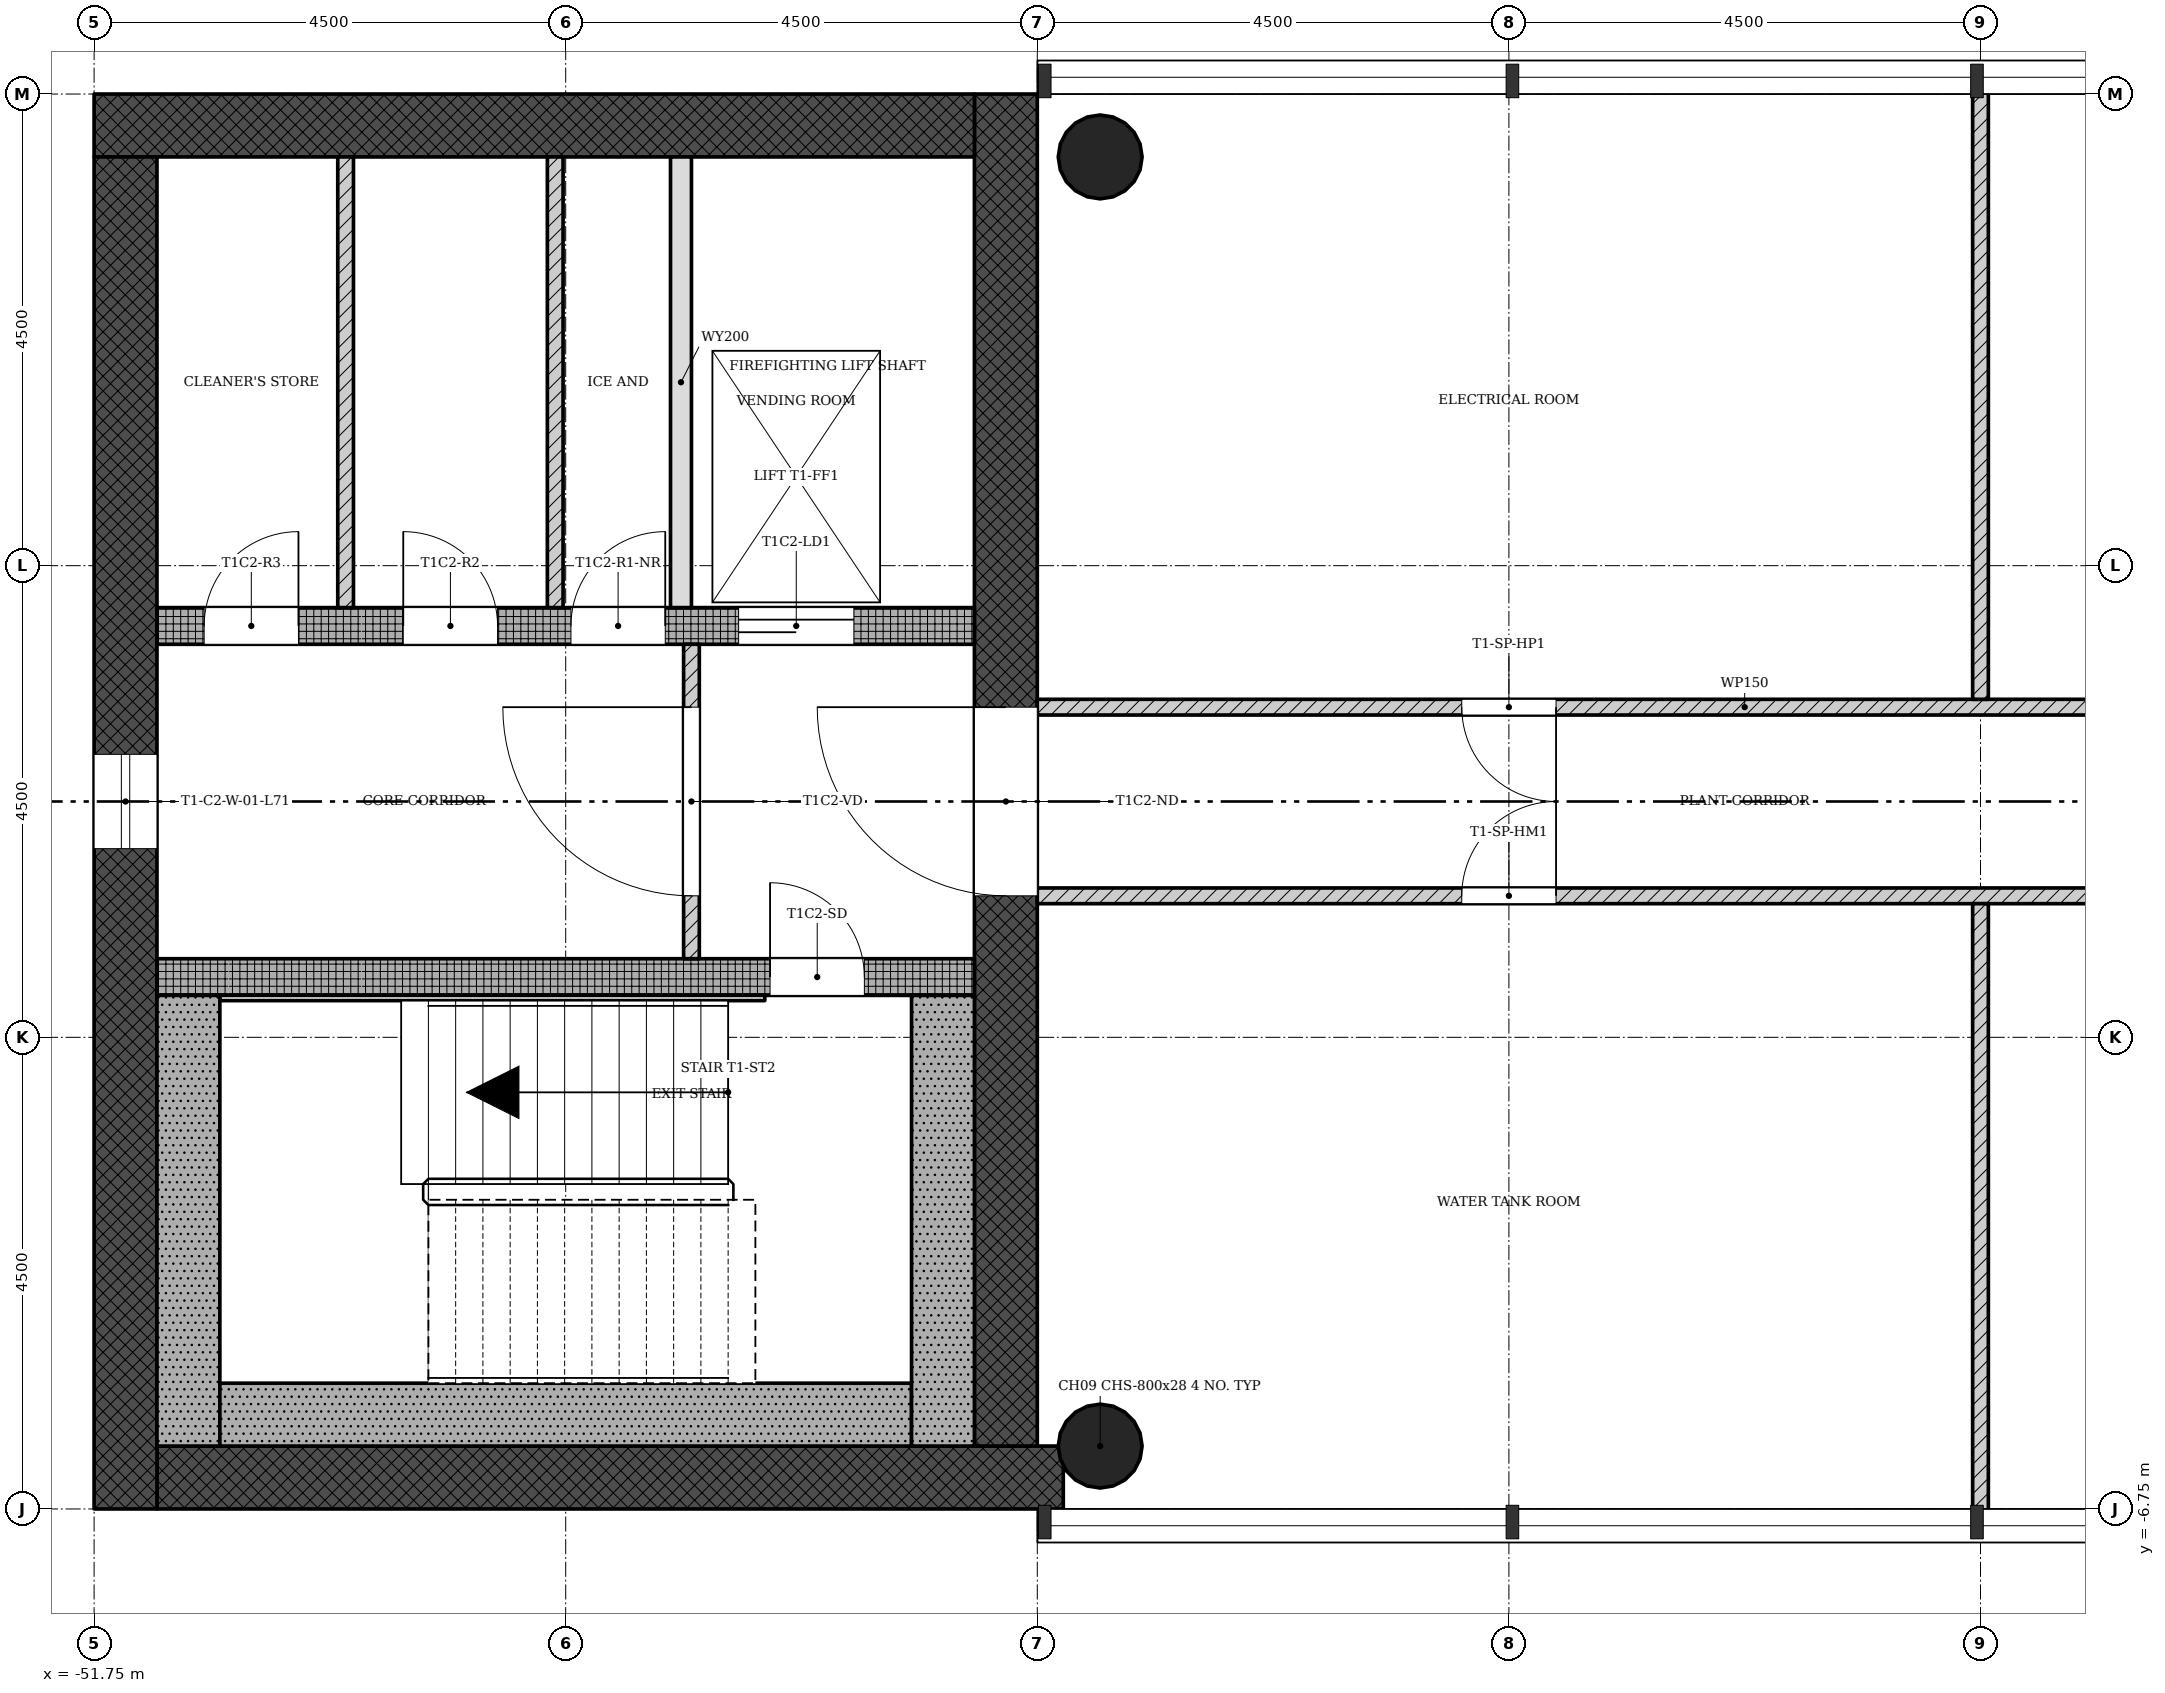
"""IFC4 building model, lengths in metres.
Left out: names, types, materials, properties, quantities, classifications, styles, units other than length and angle.
Written with IfcOpenShell. Run it as: python <this file> out.ifc"""

import sys

from ifc_helpers import new_model, si_unit, direction, frame, frame_2d, origin, origin_2d, place, context, subcontext, project, spatial, rectangle, hollow_circle, extrude, element, fill, save


model = new_model("IFC4")
c1 = context("Model", 3, precision=1e-05, world=origin(), true_north=direction((0.0, 1.0)))
c2 = subcontext(c1, "Body", "Model", "MODEL_VIEW")
j1 = project(units=[si_unit("LENGTHUNIT", "METRE"), si_unit("PLANEANGLEUNIT", "RADIAN")], contexts=[c1])
p1 = place(None, origin())
s1 = spatial("IfcSite", under=j1, at=p1, CompositionType="ELEMENT")
p2 = place(p1, origin())
s2 = spatial("IfcBuilding", under=s1, at=p2, CompositionType="ELEMENT")
p3 = place(p2, frame((0.0, 0.0, 260.4)))
s3 = spatial("IfcBuildingStorey", under=s2, at=p3, CompositionType="ELEMENT", Elevation=260.4)
p4 = place(p3, frame((-51.15, -6.45, 0.0), z_axis=(0.0, 0.0, 1.0), x_axis=(1.0, 0.0, 0.0)))
e1 = element("IfcWall", 1, at=p4, inside=s3, PredefinedType="SHEAR", context=c2, shape_type="SweptSolid", body=[
    extrude(rectangle(XDim=8.648, YDim=0.6, at=frame_2d((4.324, 0.0))), origin(), (0.0, 0.0, 1.0), 4.5),
])
p5 = place(p3, frame((-43.05, -6.15, 0.0), z_axis=(0.0, 0.0, 1.0), x_axis=(0.0, 1.0, 0.0)))
e2 = element("IfcWall", 2, at=p5, inside=s3, PredefinedType="SHEAR", context=c2, shape_type="SweptSolid", body=[
    extrude(rectangle(XDim=12.9, YDim=0.6, at=frame_2d((6.45, 0.0))), origin(), (0.0, 0.0, 1.0), 4.5),
])
p6 = place(p5, frame((5.25, 0.0, 0.0)))
e3 = element("IfcOpeningElement", 3, at=p6, cuts=e2, PredefinedType="OPENING", context=c2, shape_type="SweptSolid", body=[
    extrude(rectangle(XDim=1.8, YDim=2.1, at=frame_2d((0.9, 1.05))), frame((0.0, 0.31, 0.0), z_axis=(0.0, -1.0, 0.0), x_axis=(1.0, 0.0, 0.0)), (0.0, 0.0, 1.0), 0.62),
])
p7 = place(p3, frame((-43.35, 6.45, 0.0), z_axis=(0.0, 0.0, 1.0), x_axis=(-1.0, 0.0, 0.0)))
e4 = element("IfcWall", 4, at=p7, inside=s3, PredefinedType="SHEAR", context=c2, shape_type="SweptSolid", body=[
    extrude(rectangle(XDim=8.4, YDim=0.6, at=frame_2d((4.2, 0.0))), origin(), (0.0, 0.0, 1.0), 4.5),
])
p8 = place(p3, frame((-51.45, 6.15, 0.0), z_axis=(0.0, 0.0, 1.0), x_axis=(0.0, -1.0, 0.0)))
e5 = element("IfcWall", 5, at=p8, inside=s3, PredefinedType="SHEAR", context=c2, shape_type="SweptSolid", body=[
    extrude(rectangle(XDim=12.9, YDim=0.6, at=frame_2d((6.45, 0.0))), origin(), (0.0, 0.0, 1.0), 4.5),
])
p9 = place(p8, frame((5.7, 0.0, 0.45)))
e6 = element("IfcOpeningElement", 6, at=p9, cuts=e5, PredefinedType="OPENING", context=c2, shape_type="SweptSolid", body=[
    extrude(rectangle(XDim=0.9, YDim=2.4, at=frame_2d((0.45, 1.2))), frame((0.0, 0.31, 0.0), z_axis=(0.0, -1.0, 0.0), x_axis=(1.0, 0.0, 0.0)), (0.0, 0.0, 1.0), 0.62),
])
p10 = place(p3, frame((-51.15, -1.675, 0.0), z_axis=(0.0, 0.0, 1.0), x_axis=(1.0, 0.0, 0.0)))
e7 = element("IfcWall", 7, at=p10, inside=s3, PredefinedType="SHEAR", context=c2, shape_type="SweptSolid", body=[
    extrude(rectangle(XDim=7.8, YDim=0.35, at=frame_2d((3.9, 0.0))), origin(), (0.0, 0.0, 1.0), 4.5),
])
p11 = place(p10, frame((5.85, 0.0, 0.0)))
e8 = element("IfcOpeningElement", 8, at=p11, cuts=e7, PredefinedType="OPENING", context=c2, shape_type="SweptSolid", body=[
    extrude(rectangle(XDim=0.9, YDim=2.1, at=frame_2d((0.45, 1.05))), frame((0.0, 0.185, 0.0), z_axis=(0.0, -1.0, 0.0), x_axis=(1.0, 0.0, 0.0)), (0.0, 0.0, 1.0), 0.37),
])
p12 = place(p3, frame((-51.15, 1.675, 0.0), z_axis=(0.0, 0.0, 1.0), x_axis=(1.0, 0.0, 0.0)))
e9 = element("IfcWall", 9, at=p12, inside=s3, PredefinedType="SHEAR", context=c2, shape_type="SweptSolid", body=[
    extrude(rectangle(XDim=7.8, YDim=0.35, at=frame_2d((3.9, 0.0))), origin(), (0.0, 0.0, 1.0), 4.5),
])
p13 = place(p12, frame((5.55, 0.0, 0.0)))
e10 = element("IfcOpeningElement", 10, at=p13, cuts=e9, PredefinedType="OPENING", context=c2, shape_type="SweptSolid", body=[
    extrude(rectangle(XDim=1.1, YDim=2.1, at=frame_2d((0.55, 1.05))), frame((0.0, 0.185, 0.0), z_axis=(0.0, -1.0, 0.0), x_axis=(1.0, 0.0, 0.0)), (0.0, 0.0, 1.0), 0.37),
])
p14 = place(p12, frame((3.95, 0.0, 0.0)))
e11 = element("IfcOpeningElement", 11, at=p14, cuts=e9, PredefinedType="OPENING", context=c2, shape_type="SweptSolid", body=[
    extrude(rectangle(XDim=0.9, YDim=2.1, at=frame_2d((0.45, 1.05))), frame((0.0, 0.185, 0.0), z_axis=(0.0, -1.0, 0.0), x_axis=(1.0, 0.0, 0.0)), (0.0, 0.0, 1.0), 0.37),
])
p15 = place(p12, frame((2.35, 0.0, 0.0)))
e12 = element("IfcOpeningElement", 12, at=p15, cuts=e9, PredefinedType="OPENING", context=c2, shape_type="SweptSolid", body=[
    extrude(rectangle(XDim=0.9, YDim=2.1, at=frame_2d((0.45, 1.05))), frame((0.0, 0.185, 0.0), z_axis=(0.0, -1.0, 0.0), x_axis=(1.0, 0.0, 0.0)), (0.0, 0.0, 1.0), 0.37),
])
p16 = place(p12, frame((0.45, 0.0, 0.0)))
e13 = element("IfcOpeningElement", 13, at=p16, cuts=e9, PredefinedType="OPENING", context=c2, shape_type="SweptSolid", body=[
    extrude(rectangle(XDim=0.9, YDim=2.1, at=frame_2d((0.45, 1.05))), frame((0.0, 0.185, 0.0), z_axis=(0.0, -1.0, 0.0), x_axis=(1.0, 0.0, 0.0)), (0.0, 0.0, 1.0), 0.37),
])
for number, where, z_axis, x_axis in (
    (14, (-42.15, -6.15, 0.0), (0.0, 0.0, 1.0), (1.0, 0.0, 0.0)),
    (15, (-42.15, 6.15, 0.0), (0.0, 0.0, 1.0), (1.0, 0.0, 0.0)),
):
    element("IfcColumn", number, at=place(p3, frame(where, z_axis=z_axis, x_axis=x_axis)), inside=s3, PredefinedType="COLUMN", context=c2, shape_type="SweptSolid", body=[
        extrude(hollow_circle(Radius=0.4, WallThickness=0.028, at=origin_2d()), origin(), (0.0, 0.0, 1.0), 4.5),
    ])
p17 = place(p3, frame((-46.05, 1.5, 0.0), z_axis=(0.0, 0.0, 1.0), x_axis=(0.0, -1.0, 0.0)))
e16 = element("IfcWall", 16, at=p17, inside=s3, PredefinedType="PARTITIONING", context=c2, shape_type="SweptSolid", body=[
    extrude(rectangle(XDim=3.0, YDim=0.15, at=frame_2d((1.5, 0.0))), origin(), (0.0, 0.0, 1.0), 4.09),
])
p18 = place(p17, frame((0.6, 0.0, 0.0)))
e17 = element("IfcOpeningElement", 17, at=p18, cuts=e16, PredefinedType="OPENING", context=c2, shape_type="SweptSolid", body=[
    extrude(rectangle(XDim=1.8, YDim=2.1, at=frame_2d((0.9, 1.05))), frame((0.0, 0.085, 0.0), z_axis=(0.0, -1.0, 0.0), x_axis=(1.0, 0.0, 0.0)), (0.0, 0.0, 1.0), 0.17),
])
p19 = place(p3, frame((-46.15, 6.15, 0.0), z_axis=(0.0, 0.0, 1.0), x_axis=(0.0, -1.0, 0.0)))
e18 = element("IfcWall", 18, at=p19, inside=s3, PredefinedType="SOLIDWALL", context=c2, shape_type="SweptSolid", body=[
    extrude(rectangle(XDim=4.3, YDim=0.2, at=frame_2d((2.15, 0.0))), origin(), (0.0, 0.0, 1.0), 4.09),
])
for number, where, z_axis, x_axis in (
    (19, (-47.35, 6.15, 0.0), (0.0, 0.0, 1.0), (0.0, -1.0, 0.0)),
    (20, (-49.35, 6.15, 0.0), (0.0, 0.0, 1.0), (0.0, -1.0, 0.0)),
):
    element("IfcWall", number, at=place(p3, frame(where, z_axis=z_axis, x_axis=x_axis)), inside=s3, PredefinedType="PARTITIONING", context=c2, shape_type="SweptSolid", body=[
        extrude(rectangle(XDim=4.3, YDim=0.15, at=frame_2d((2.15, 0.0))), origin(), (0.0, 0.0, 1.0), 4.09),
    ])
p20 = place(p3, frame((-42.75, 0.9, 0.0), z_axis=(0.0, 0.0, 1.0), x_axis=(1.0, 0.0, 0.0)))
e21 = element("IfcWall", 21, at=p20, inside=s3, PredefinedType="PARTITIONING", context=c2, shape_type="SweptSolid", body=[
    extrude(rectangle(XDim=13.5, YDim=0.15, at=frame_2d((6.75, 0.0))), origin(), (0.0, 0.0, 1.0), 4.09),
])
p21 = place(p20, frame((4.05, 0.0, 0.0)))
e22 = element("IfcOpeningElement", 22, at=p21, cuts=e21, PredefinedType="OPENING", context=c2, shape_type="SweptSolid", body=[
    extrude(rectangle(XDim=0.9, YDim=2.1, at=frame_2d((0.45, 1.05))), frame((0.0, 0.085, 0.0), z_axis=(0.0, -1.0, 0.0), x_axis=(1.0, 0.0, 0.0)), (0.0, 0.0, 1.0), 0.17),
])
p22 = place(p20, frame((10.8, 0.0, 0.0)))
e23 = element("IfcOpeningElement", 23, at=p22, cuts=e21, PredefinedType="OPENING", context=c2, shape_type="SweptSolid", body=[
    extrude(rectangle(XDim=0.9, YDim=2.1, at=frame_2d((0.45, 1.05))), frame((0.0, 0.085, 0.0), z_axis=(0.0, -1.0, 0.0), x_axis=(1.0, 0.0, 0.0)), (0.0, 0.0, 1.0), 0.17),
])
p23 = place(p3, frame((-33.75, 0.975, 0.0), z_axis=(0.0, 0.0, 1.0), x_axis=(0.0, 1.0, 0.0)))
e24 = element("IfcWall", 24, at=p23, inside=s3, PredefinedType="PARTITIONING", context=c2, shape_type="SweptSolid", body=[
    extrude(rectangle(XDim=5.875, YDim=0.15, at=frame_2d((2.938, 0.0))), origin(), (0.0, 0.0, 1.0), 4.09),
])
p24 = place(p3, frame((-42.75, -0.9, 0.0), z_axis=(0.0, 0.0, 1.0), x_axis=(1.0, 0.0, 0.0)))
e25 = element("IfcWall", 25, at=p24, inside=s3, PredefinedType="PARTITIONING", context=c2, shape_type="SweptSolid", body=[
    extrude(rectangle(XDim=13.5, YDim=0.15, at=frame_2d((6.75, 0.0))), origin(), (0.0, 0.0, 1.0), 4.09),
])
p25 = place(p24, frame((4.05, 0.0, 0.0)))
e26 = element("IfcOpeningElement", 26, at=p25, cuts=e25, PredefinedType="OPENING", context=c2, shape_type="SweptSolid", body=[
    extrude(rectangle(XDim=0.9, YDim=2.1, at=frame_2d((0.45, 1.05))), frame((0.0, 0.085, 0.0), z_axis=(0.0, -1.0, 0.0), x_axis=(1.0, 0.0, 0.0)), (0.0, 0.0, 1.0), 0.17),
])
p26 = place(p24, frame((10.8, 0.0, 0.0)))
e27 = element("IfcOpeningElement", 27, at=p26, cuts=e25, PredefinedType="OPENING", context=c2, shape_type="SweptSolid", body=[
    extrude(rectangle(XDim=0.9, YDim=2.1, at=frame_2d((0.45, 1.05))), frame((0.0, 0.085, 0.0), z_axis=(0.0, -1.0, 0.0), x_axis=(1.0, 0.0, 0.0)), (0.0, 0.0, 1.0), 0.17),
])
p27 = place(p3, frame((-33.75, -0.975, 0.0), z_axis=(0.0, 0.0, 1.0), x_axis=(0.0, -1.0, 0.0)))
e28 = element("IfcWall", 28, at=p27, inside=s3, PredefinedType="PARTITIONING", context=c2, shape_type="SweptSolid", body=[
    extrude(rectangle(XDim=5.875, YDim=0.15, at=frame_2d((2.938, 0.0))), origin(), (0.0, 0.0, 1.0), 4.09),
])
p28 = place(p3, frame((-50.85, -1.85, 0.0), z_axis=(0.0, 0.0, 1.0), x_axis=(0.0, -1.0, 0.0)))
e29 = element("IfcWall", 29, at=p28, inside=s3, PredefinedType="SHEAR", context=c2, shape_type="SweptSolid", body=[
    extrude(rectangle(XDim=4.3, YDim=0.6, at=frame_2d((2.15, 0.0))), origin(), (0.0, 0.0, 1.0), 4.5),
])
p29 = place(p3, frame((-43.95, -5.85, 0.0), z_axis=(0.0, 0.0, 1.0), x_axis=(-1.0, 0.0, 0.0)))
e30 = element("IfcWall", 30, at=p29, inside=s3, PredefinedType="SHEAR", context=c2, shape_type="SweptSolid", body=[
    extrude(rectangle(XDim=6.6, YDim=0.6, at=frame_2d((3.3, 0.0))), origin(), (0.0, 0.0, 1.0), 4.5),
])
p30 = place(p3, frame((-43.65, -1.85, 0.0), z_axis=(0.0, 0.0, 1.0), x_axis=(0.0, -1.0, 0.0)))
e31 = element("IfcWall", 31, at=p30, inside=s3, PredefinedType="SHEAR", context=c2, shape_type="SweptSolid", body=[
    extrude(rectangle(XDim=4.3, YDim=0.6, at=frame_2d((2.15, 0.0))), origin(), (0.0, 0.0, 1.0), 4.5),
])
p31 = place(p3, frame((-45.35, -1.875, 0.0), z_axis=(0.0, 0.0, 1.0), x_axis=(-1.0, 0.0, 0.0)))
e32 = element("IfcWall", 32, at=p31, inside=s3, PredefinedType="SHEAR", context=c2, shape_type="SweptSolid", body=[
    extrude(rectangle(XDim=5.2, YDim=0.05, at=frame_2d((2.6, 0.0))), origin(), (0.0, 0.0, 1.0), 4.5),
])
p32 = place(p9, origin())
e33 = element("IfcWindow", 33, at=p32, inside=s3, PartitioningType="SINGLE_PANEL", PredefinedType="WINDOW", context=c2, shape_type="SweptSolid", body=[
    extrude(rectangle(XDim=0.9, YDim=2.4, at=frame_2d((0.45, 1.2))), frame((0.0, 0.03, 0.0), z_axis=(0.0, -1.0, 0.0), x_axis=(1.0, 0.0, 0.0)), (0.0, 0.0, 1.0), 0.06),
])
fill(e6, e33)
p33 = place(p18, origin())
e34 = element("IfcDoor", 34, at=p33, inside=s3, OperationType="SINGLE_SWING_LEFT", PredefinedType="DOOR", context=c2, shape_type="SweptSolid", body=[
    extrude(rectangle(XDim=1.8, YDim=2.1, at=frame_2d((0.9, 1.05))), frame((0.0, 0.025, 0.0), z_axis=(0.0, -1.0, 0.0), x_axis=(1.0, 0.0, 0.0)), (0.0, 0.0, 1.0), 0.05),
])
fill(e17, e34)
p34 = place(p21, origin())
e35 = element("IfcDoor", 35, at=p34, inside=s3, OperationType="SINGLE_SWING_RIGHT", PredefinedType="DOOR", context=c2, shape_type="SweptSolid", body=[
    extrude(rectangle(XDim=0.9, YDim=2.1, at=frame_2d((0.45, 1.05))), frame((0.0, 0.025, 0.0), z_axis=(0.0, -1.0, 0.0), x_axis=(1.0, 0.0, 0.0)), (0.0, 0.0, 1.0), 0.05),
])
fill(e22, e35)
p35 = place(p25, origin())
e36 = element("IfcDoor", 36, at=p35, inside=s3, OperationType="SINGLE_SWING_LEFT", PredefinedType="DOOR", context=c2, shape_type="SweptSolid", body=[
    extrude(rectangle(XDim=0.9, YDim=2.1, at=frame_2d((0.45, 1.05))), frame((0.0, 0.025, 0.0), z_axis=(0.0, -1.0, 0.0), x_axis=(1.0, 0.0, 0.0)), (0.0, 0.0, 1.0), 0.05),
])
fill(e26, e36)
p36 = place(p11, origin())
e37 = element("IfcDoor", 37, at=p36, inside=s3, OperationType="SINGLE_SWING_RIGHT", PredefinedType="DOOR", context=c2, shape_type="SweptSolid", body=[
    extrude(rectangle(XDim=0.9, YDim=2.1, at=frame_2d((0.45, 1.05))), frame((0.0, 0.025, 0.0), z_axis=(0.0, -1.0, 0.0), x_axis=(1.0, 0.0, 0.0)), (0.0, 0.0, 1.0), 0.05),
])
fill(e8, e37)
p37 = place(p13, origin())
e38 = element("IfcDoor", 38, at=p37, inside=s3, OperationType="SLIDING_TO_LEFT", PredefinedType="DOOR", context=c2, shape_type="SweptSolid", body=[
    extrude(rectangle(XDim=1.1, YDim=2.1, at=frame_2d((0.55, 1.05))), frame((0.0, 0.025, 0.0), z_axis=(0.0, -1.0, 0.0), x_axis=(1.0, 0.0, 0.0)), (0.0, 0.0, 1.0), 0.05),
])
fill(e10, e38)
p38 = place(p14, origin())
e39 = element("IfcDoor", 39, at=p38, inside=s3, OperationType="SINGLE_SWING_LEFT", PredefinedType="DOOR", context=c2, shape_type="SweptSolid", body=[
    extrude(rectangle(XDim=0.9, YDim=2.1, at=frame_2d((0.45, 1.05))), frame((0.0, 0.025, 0.0), z_axis=(0.0, -1.0, 0.0), x_axis=(1.0, 0.0, 0.0)), (0.0, 0.0, 1.0), 0.05),
])
fill(e11, e39)
p39 = place(p15, origin())
e40 = element("IfcDoor", 40, at=p39, inside=s3, OperationType="SINGLE_SWING_RIGHT", PredefinedType="DOOR", context=c2, shape_type="SweptSolid", body=[
    extrude(rectangle(XDim=0.9, YDim=2.1, at=frame_2d((0.45, 1.05))), frame((0.0, 0.025, 0.0), z_axis=(0.0, -1.0, 0.0), x_axis=(1.0, 0.0, 0.0)), (0.0, 0.0, 1.0), 0.05),
])
fill(e12, e40)
p40 = place(p16, origin())
e41 = element("IfcDoor", 41, at=p40, inside=s3, OperationType="SINGLE_SWING_LEFT", PredefinedType="DOOR", context=c2, shape_type="SweptSolid", body=[
    extrude(rectangle(XDim=0.9, YDim=2.1, at=frame_2d((0.45, 1.05))), frame((0.0, 0.025, 0.0), z_axis=(0.0, -1.0, 0.0), x_axis=(1.0, 0.0, 0.0)), (0.0, 0.0, 1.0), 0.05),
])
fill(e13, e41)
p41 = place(p6, origin())
e42 = element("IfcDoor", 42, at=p41, inside=s3, OperationType="SINGLE_SWING_LEFT", PredefinedType="DOOR", context=c2, shape_type="SweptSolid", body=[
    extrude(rectangle(XDim=1.8, YDim=2.1, at=frame_2d((0.9, 1.05))), frame((0.0, 0.025, 0.0), z_axis=(0.0, -1.0, 0.0), x_axis=(1.0, 0.0, 0.0)), (0.0, 0.0, 1.0), 0.05),
])
fill(e3, e42)
save(model, sys.argv[1])
